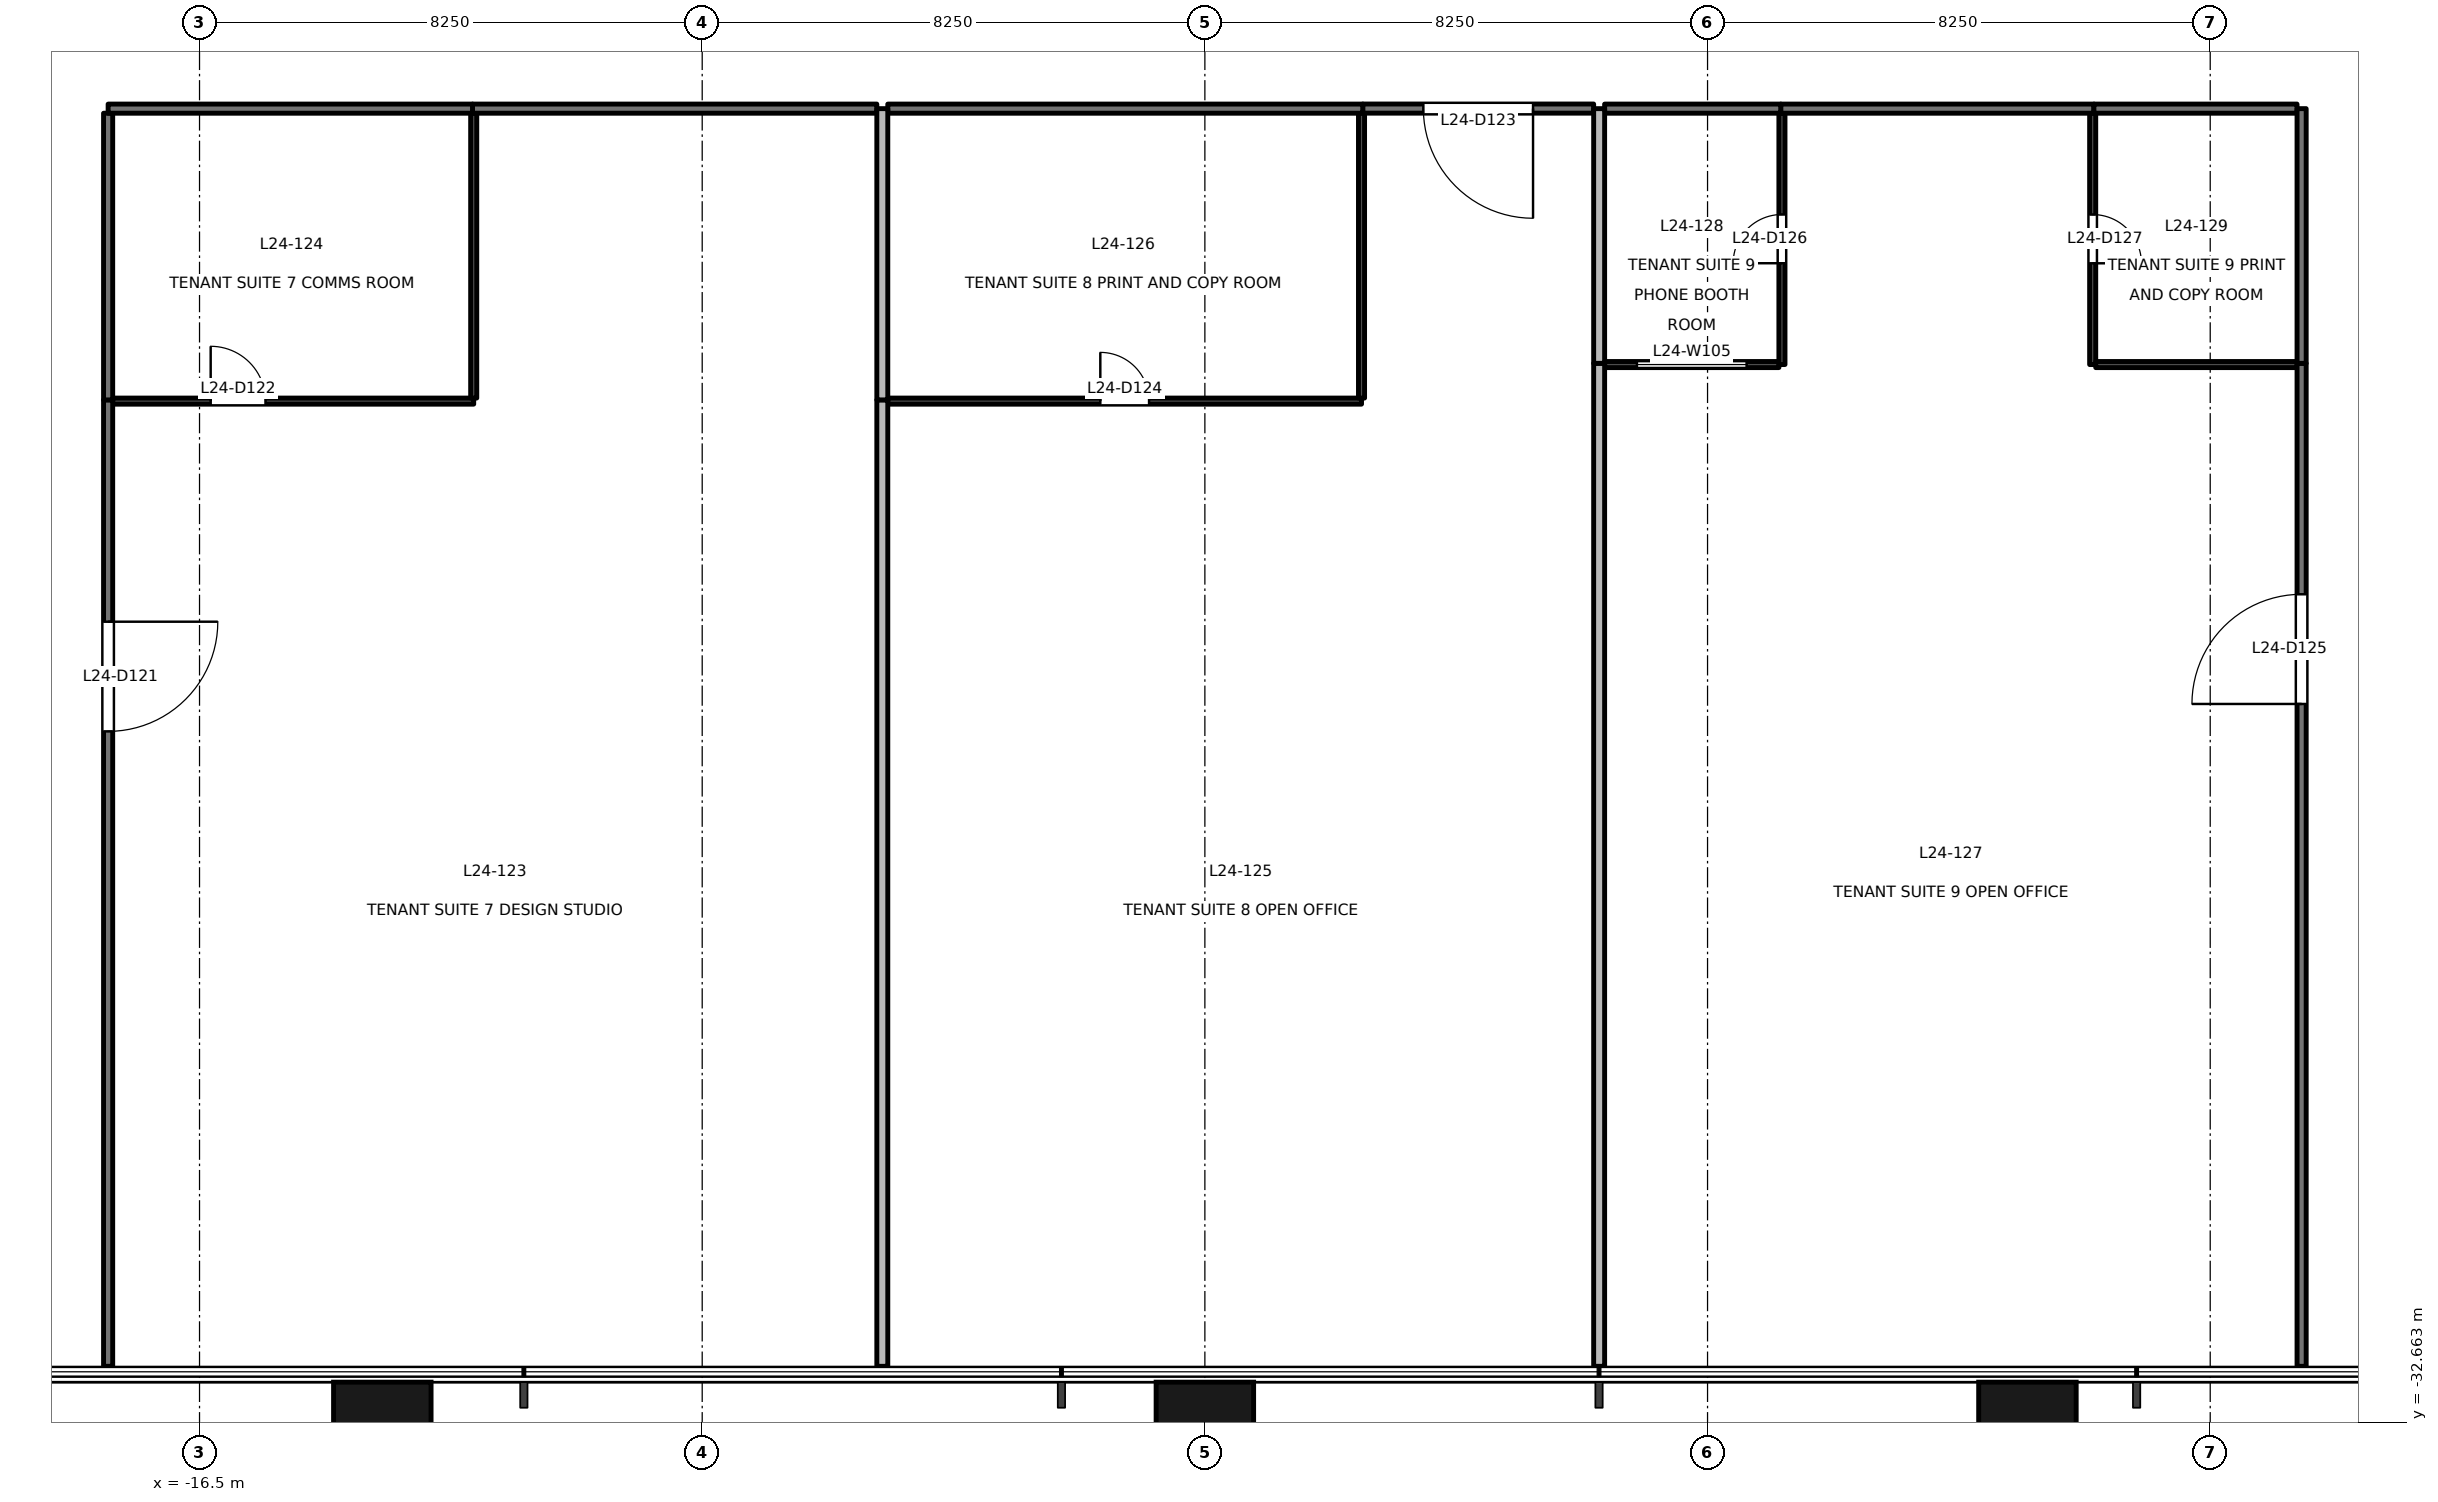
"""IFC4 building model, lengths in metres.
Left out: names, types, materials, properties, quantities, classifications, styles, units other than length and angle.
Written with IfcOpenShell. Run it as: python <this file> out.ifc"""

import sys

from ifc_helpers import new_model, si_unit, direction, frame, frame_2d, origin, origin_2d, place, context, subcontext, project, spatial, rectangle, extrude, element, fill, save


model = new_model("IFC4")
c1 = context("Model", 3, precision=1e-05, world=origin(), true_north=direction((0.0, 1.0)))
c2 = subcontext(c1, "Body", "Model", "MODEL_VIEW")
j1 = project(units=[si_unit("LENGTHUNIT", "METRE"), si_unit("PLANEANGLEUNIT", "RADIAN")], contexts=[c1])
p1 = place(None, origin())
s1 = spatial("IfcSite", under=j1, at=p1, CompositionType="ELEMENT")
p2 = place(p1, origin())
s2 = spatial("IfcBuilding", under=s1, at=p2, CompositionType="ELEMENT")
p3 = place(p2, frame((0.0, 0.0, 107.7)))
s3 = spatial("IfcBuildingStorey", under=s2, at=p3, CompositionType="ELEMENT", Elevation=107.7)
for number, where, z_axis, x_axis in (
    (1, (-13.5, -32.9, -0.2), (0.0, 0.0, 1.0), (1.0, 0.0, 0.0)),
    (2, (0.0, -32.9, -0.2), (0.0, 0.0, 1.0), (1.0, 0.0, 0.0)),
    (3, (13.5, -32.9, -0.2), (0.0, 0.0, 1.0), (1.0, 0.0, 0.0)),
):
    element("IfcColumn", number, at=place(p3, frame(where, z_axis=z_axis, x_axis=x_axis)), inside=s3, PredefinedType="COLUMN", context=c2, shape_type="SweptSolid", body=[
        extrude(rectangle(XDim=1.6, YDim=1.8, at=origin_2d()), origin(), (0.0, 0.0, 1.0), 4.0),
    ])
p4 = place(p3, frame((-18.0, -15.88, 0.0), z_axis=(0.0, 0.0, 1.0), x_axis=(0.0, -1.0, 0.0)))
e4 = element("IfcWall", 4, at=p4, inside=s3, PredefinedType="PARTITIONING", context=c2, shape_type="SweptSolid", body=[
    extrude(rectangle(XDim=15.86, YDim=0.15, at=frame_2d((7.93, 0.0))), origin(), (0.0, 0.0, 1.0), 3.8),
])
p5 = place(p4, frame((3.64, 0.0, 0.0)))
e5 = element("IfcOpeningElement", 5, at=p5, cuts=e4, PredefinedType="OPENING", context=c2, shape_type="SweptSolid", body=[
    extrude(rectangle(XDim=1.8, YDim=2.1, at=frame_2d((0.9, 1.05))), frame((0.0, 0.085, 0.0), z_axis=(0.0, -1.0, 0.0), x_axis=(1.0, 0.0, 0.0)), (0.0, 0.0, 1.0), 0.171),
])
p6 = place(p3, frame((-5.384, -11.1, 0.0), z_axis=(0.0, 0.0, 1.0), x_axis=(-1.0, 0.0, 0.0)))
e6 = element("IfcWall", 6, at=p6, inside=s3, PredefinedType="PARTITIONING", context=c2, shape_type="SweptSolid", body=[
    extrude(rectangle(XDim=6.636, YDim=0.15, at=frame_2d((3.318, 0.0))), origin(), (0.0, 0.0, 1.0), 2.8),
])
p7 = place(p3, frame((-18.0, -11.175, 0.0), z_axis=(0.0, 0.0, 1.0), x_axis=(0.0, -1.0, 0.0)))
e7 = element("IfcWall", 7, at=p7, inside=s3, PredefinedType="PARTITIONING", context=c2, shape_type="SweptSolid", body=[
    extrude(rectangle(XDim=4.705, YDim=0.15, at=frame_2d((2.353, 0.0))), origin(), (0.0, 0.0, 1.0), 3.8),
])
p8 = place(p3, frame((-12.02, -11.1, 0.0), z_axis=(0.0, 0.0, 1.0), x_axis=(-1.0, 0.0, 0.0)))
e8 = element("IfcWall", 8, at=p8, inside=s3, PredefinedType="PARTITIONING", context=c2, shape_type="SweptSolid", body=[
    extrude(rectangle(XDim=5.98, YDim=0.15, at=frame_2d((2.99, 0.0))), origin(), (0.0, 0.0, 1.0), 2.8),
])
p9 = place(p3, frame((6.381, -11.099, 0.0), z_axis=(0.0, 0.0, 1.0), x_axis=(-1.0, 0.0, 0.0)))
e9 = element("IfcWall", 9, at=p9, inside=s3, PredefinedType="PARTITIONING", context=c2, shape_type="SweptSolid", body=[
    extrude(rectangle(XDim=3.79, YDim=0.15, at=frame_2d((1.895, 0.0))), origin(), (0.0, 0.0, 1.0), 2.8),
])
p10 = place(p9, frame((0.995, 0.0, 0.0)))
e10 = element("IfcOpeningElement", 10, at=p10, cuts=e9, PredefinedType="OPENING", context=c2, shape_type="SweptSolid", body=[
    extrude(rectangle(XDim=1.8, YDim=2.1, at=frame_2d((0.9, 1.05))), frame((0.0, 0.085, 0.0), z_axis=(0.0, -1.0, 0.0), x_axis=(1.0, 0.0, 0.0)), (0.0, 0.0, 1.0), 0.171),
])
p11 = place(p3, frame((2.591, -11.1, 0.0), z_axis=(0.0, 0.0, 1.0), x_axis=(-1.0, 0.0, 0.0)))
e11 = element("IfcWall", 11, at=p11, inside=s3, PredefinedType="PARTITIONING", context=c2, shape_type="SweptSolid", body=[
    extrude(rectangle(XDim=7.795, YDim=0.15, at=frame_2d((3.897, 0.0))), origin(), (0.0, 0.0, 1.0), 2.8),
])
p12 = place(p3, frame((14.591, -11.1, 0.0), z_axis=(0.0, 0.0, 1.0), x_axis=(-1.0, 0.0, 0.0)))
e12 = element("IfcWall", 12, at=p12, inside=s3, PredefinedType="PARTITIONING", context=c2, shape_type="SweptSolid", body=[
    extrude(rectangle(XDim=5.14, YDim=0.15, at=frame_2d((2.57, 0.0))), origin(), (0.0, 0.0, 1.0), 2.8),
])
p13 = place(p3, frame((18.0, -31.74, 0.0), z_axis=(0.0, 0.0, 1.0), x_axis=(0.0, 1.0, 0.0)))
e13 = element("IfcWall", 13, at=p13, inside=s3, PredefinedType="PARTITIONING", context=c2, shape_type="SweptSolid", body=[
    extrude(rectangle(XDim=16.46, YDim=0.15, at=frame_2d((8.23, 0.0))), origin(), (0.0, 0.0, 1.0), 2.4),
])
p14 = place(p13, frame((10.87, 0.0, 0.0)))
e14 = element("IfcOpeningElement", 14, at=p14, cuts=e13, PredefinedType="OPENING", context=c2, shape_type="SweptSolid", body=[
    extrude(rectangle(XDim=1.8, YDim=2.1, at=frame_2d((0.9, 1.05))), frame((0.0, 0.085, 0.0), z_axis=(0.0, -1.0, 0.0), x_axis=(1.0, 0.0, 0.0)), (0.0, 0.0, 1.0), 0.171),
])
p15 = place(p3, frame((9.451, -11.1, 0.0), z_axis=(0.0, 0.0, 1.0), x_axis=(-1.0, 0.0, 0.0)))
e15 = element("IfcWall", 15, at=p15, inside=s3, PredefinedType="PARTITIONING", context=c2, shape_type="SweptSolid", body=[
    extrude(rectangle(XDim=2.89, YDim=0.15, at=frame_2d((1.445, 0.0))), origin(), (0.0, 0.0, 1.0), 2.8),
])
p16 = place(p3, frame((17.925, -11.1, 0.0), z_axis=(0.0, 0.0, 1.0), x_axis=(-1.0, 0.0, 0.0)))
e16 = element("IfcWall", 16, at=p16, inside=s3, PredefinedType="PARTITIONING", context=c2, shape_type="SweptSolid", body=[
    extrude(rectangle(XDim=3.334, YDim=0.15, at=frame_2d((1.667, 0.0))), origin(), (0.0, 0.0, 1.0), 2.4),
])
p17 = place(p3, frame((18.0, -15.28, 0.0), z_axis=(0.0, 0.0, 1.0), x_axis=(0.0, 1.0, 0.0)))
e17 = element("IfcWall", 17, at=p17, inside=s3, PredefinedType="PARTITIONING", context=c2, shape_type="SweptSolid", body=[
    extrude(rectangle(XDim=4.18, YDim=0.15, at=frame_2d((2.09, 0.0))), origin(), (0.0, 0.0, 1.0), 2.4),
])
p18 = place(p3, frame((-17.925, -15.9, 0.0), z_axis=(0.0, 0.0, 1.0), x_axis=(1.0, 0.0, 0.0)))
e18 = element("IfcWall", 18, at=p18, inside=s3, PredefinedType="PARTITIONING", context=c2, shape_type="SweptSolid", body=[
    extrude(rectangle(XDim=5.925, YDim=0.1, at=frame_2d((2.962, 0.0))), origin(), (0.0, 0.0, 1.0), 2.8),
])
p19 = place(p18, frame((1.608, 0.0, 0.0)))
e19 = element("IfcOpeningElement", 19, at=p19, cuts=e18, PredefinedType="OPENING", context=c2, shape_type="SweptSolid", body=[
    extrude(rectangle(XDim=0.9, YDim=2.1, at=frame_2d((0.45, 1.05))), frame((0.0, 0.061, 0.0), z_axis=(0.0, -1.0, 0.0), x_axis=(1.0, 0.0, 0.0)), (0.0, 0.0, 1.0), 0.121),
])
p20 = place(p3, frame((-12.0, -15.85, 0.0), z_axis=(0.0, 0.0, 1.0), x_axis=(0.0, 1.0, 0.0)))
e20 = element("IfcWall", 20, at=p20, inside=s3, PredefinedType="PARTITIONING", context=c2, shape_type="SweptSolid", body=[
    extrude(rectangle(XDim=4.675, YDim=0.1, at=frame_2d((2.337, 0.0))), origin(), (0.0, 0.0, 1.0), 3.8),
])
p21 = place(p3, frame((-5.294, -15.88, 0.0), z_axis=(0.0, 0.0, 1.0), x_axis=(0.0, -1.0, 0.0)))
e21 = element("IfcWall", 21, at=p21, inside=s3, PredefinedType="PARTITIONING", context=c2, shape_type="SweptSolid", body=[
    extrude(rectangle(XDim=15.86, YDim=0.18, at=frame_2d((7.93, 0.0))), origin(), (0.0, 0.0, 1.0), 3.8),
])
p22 = place(p3, frame((-5.294, -11.1, 0.0), z_axis=(0.0, 0.0, 1.0), x_axis=(0.0, -1.0, 0.0)))
e22 = element("IfcWall", 22, at=p22, inside=s3, PredefinedType="PARTITIONING", context=c2, shape_type="SweptSolid", body=[
    extrude(rectangle(XDim=4.78, YDim=0.18, at=frame_2d((2.39, 0.0))), origin(), (0.0, 0.0, 1.0), 3.8),
])
p23 = place(p3, frame((-5.204, -15.9, 0.0), z_axis=(0.0, 0.0, 1.0), x_axis=(1.0, 0.0, 0.0)))
e23 = element("IfcWall", 23, at=p23, inside=s3, PredefinedType="PARTITIONING", context=c2, shape_type="SweptSolid", body=[
    extrude(rectangle(XDim=7.775, YDim=0.1, at=frame_2d((3.888, 0.0))), origin(), (0.0, 0.0, 1.0), 2.8),
])
p24 = place(p23, frame((3.488, 0.0, 0.0)))
e24 = element("IfcOpeningElement", 24, at=p24, cuts=e23, PredefinedType="OPENING", context=c2, shape_type="SweptSolid", body=[
    extrude(rectangle(XDim=0.8, YDim=2.1, at=frame_2d((0.4, 1.05))), frame((0.0, 0.061, 0.0), z_axis=(0.0, -1.0, 0.0), x_axis=(1.0, 0.0, 0.0)), (0.0, 0.0, 1.0), 0.121),
])
p25 = place(p3, frame((2.571, -15.85, 0.0), z_axis=(0.0, 0.0, 1.0), x_axis=(0.0, 1.0, 0.0)))
e25 = element("IfcWall", 25, at=p25, inside=s3, PredefinedType="PARTITIONING", context=c2, shape_type="SweptSolid", body=[
    extrude(rectangle(XDim=4.675, YDim=0.1, at=frame_2d((2.337, 0.0))), origin(), (0.0, 0.0, 1.0), 3.8),
])
p26 = place(p3, frame((6.471, -15.28, 0.0), z_axis=(0.0, 0.0, 1.0), x_axis=(0.0, -1.0, 0.0)))
e26 = element("IfcWall", 26, at=p26, inside=s3, PredefinedType="PARTITIONING", context=c2, shape_type="SweptSolid", body=[
    extrude(rectangle(XDim=16.46, YDim=0.18, at=frame_2d((8.23, 0.0))), origin(), (0.0, 0.0, 1.0), 3.8),
])
p27 = place(p3, frame((6.471, -11.1, 0.0), z_axis=(0.0, 0.0, 1.0), x_axis=(0.0, -1.0, 0.0)))
e27 = element("IfcWall", 27, at=p27, inside=s3, PredefinedType="PARTITIONING", context=c2, shape_type="SweptSolid", body=[
    extrude(rectangle(XDim=4.18, YDim=0.18, at=frame_2d((2.09, 0.0))), origin(), (0.0, 0.0, 1.0), 3.8),
])
p28 = place(p3, frame((6.561, -15.3, 0.0), z_axis=(0.0, 0.0, 1.0), x_axis=(1.0, 0.0, 0.0)))
e28 = element("IfcWall", 28, at=p28, inside=s3, PredefinedType="PARTITIONING", context=c2, shape_type="SweptSolid", body=[
    extrude(rectangle(XDim=2.86, YDim=0.1, at=frame_2d((1.43, 0.0))), origin(), (0.0, 0.0, 1.0), 2.8),
])
p29 = place(p28, frame((0.53, 0.0, 0.9)))
e29 = element("IfcOpeningElement", 29, at=p29, cuts=e28, PredefinedType="OPENING", context=c2, shape_type="SweptSolid", body=[
    extrude(rectangle(XDim=1.8, YDim=1.2, at=frame_2d((0.9, 0.6))), frame((0.0, 0.061, 0.0), z_axis=(0.0, -1.0, 0.0), x_axis=(1.0, 0.0, 0.0)), (0.0, 0.0, 1.0), 0.121),
])
p30 = place(p3, frame((9.471, -15.3, 0.0), z_axis=(0.0, 0.0, 1.0), x_axis=(0.0, 1.0, 0.0)))
e30 = element("IfcWall", 30, at=p30, inside=s3, PredefinedType="PARTITIONING", context=c2, shape_type="SweptSolid", body=[
    extrude(rectangle(XDim=4.125, YDim=0.1, at=frame_2d((2.062, 0.0))), origin(), (0.0, 0.0, 1.0), 3.8),
])
p31 = place(p30, frame((1.663, 0.0, 0.0)))
e31 = element("IfcOpeningElement", 31, at=p31, cuts=e30, PredefinedType="OPENING", context=c2, shape_type="SweptSolid", body=[
    extrude(rectangle(XDim=0.8, YDim=2.1, at=frame_2d((0.4, 1.05))), frame((0.0, 0.061, 0.0), z_axis=(0.0, -1.0, 0.0), x_axis=(1.0, 0.0, 0.0)), (0.0, 0.0, 1.0), 0.121),
])
p32 = place(p3, frame((14.571, -11.175, 0.0), z_axis=(0.0, 0.0, 1.0), x_axis=(0.0, -1.0, 0.0)))
e32 = element("IfcWall", 32, at=p32, inside=s3, PredefinedType="PARTITIONING", context=c2, shape_type="SweptSolid", body=[
    extrude(rectangle(XDim=4.125, YDim=0.1, at=frame_2d((2.062, 0.0))), origin(), (0.0, 0.0, 1.0), 3.8),
])
p33 = place(p32, frame((1.663, 0.0, 0.0)))
e33 = element("IfcOpeningElement", 33, at=p33, cuts=e32, PredefinedType="OPENING", context=c2, shape_type="SweptSolid", body=[
    extrude(rectangle(XDim=0.8, YDim=2.1, at=frame_2d((0.4, 1.05))), frame((0.0, 0.061, 0.0), z_axis=(0.0, -1.0, 0.0), x_axis=(1.0, 0.0, 0.0)), (0.0, 0.0, 1.0), 0.121),
])
p34 = place(p3, frame((14.621, -15.3, 0.0), z_axis=(0.0, 0.0, 1.0), x_axis=(1.0, 0.0, 0.0)))
e34 = element("IfcWall", 34, at=p34, inside=s3, PredefinedType="PARTITIONING", context=c2, shape_type="SweptSolid", body=[
    extrude(rectangle(XDim=3.304, YDim=0.1, at=frame_2d((1.652, 0.0))), origin(), (0.0, 0.0, 1.0), 2.4),
])
p35 = place(p5, origin())
e35 = element("IfcDoor", 35, at=p35, inside=s3, OperationType="DOUBLE_DOOR_SINGLE_SWING", PredefinedType="DOOR", context=c2, shape_type="SweptSolid", body=[
    extrude(rectangle(XDim=1.8, YDim=2.1, at=frame_2d((0.9, 1.05))), frame((0.0, 0.025, 0.0), z_axis=(0.0, -1.0, 0.0), x_axis=(1.0, 0.0, 0.0)), (0.0, 0.0, 1.0), 0.05),
])
fill(e5, e35)
p36 = place(p19, origin())
e36 = element("IfcDoor", 36, at=p36, inside=s3, OperationType="SINGLE_SWING_LEFT", PredefinedType="DOOR", context=c2, shape_type="SweptSolid", body=[
    extrude(rectangle(XDim=0.9, YDim=2.1, at=frame_2d((0.45, 1.05))), frame((0.0, 0.025, 0.0), z_axis=(0.0, -1.0, 0.0), x_axis=(1.0, 0.0, 0.0)), (0.0, 0.0, 1.0), 0.05),
])
fill(e19, e36)
p37 = place(p10, origin())
e37 = element("IfcDoor", 37, at=p37, inside=s3, OperationType="DOUBLE_DOOR_SINGLE_SWING", PredefinedType="DOOR", context=c2, shape_type="SweptSolid", body=[
    extrude(rectangle(XDim=1.8, YDim=2.1, at=frame_2d((0.9, 1.05))), frame((0.0, 0.025, 0.0), z_axis=(0.0, -1.0, 0.0), x_axis=(1.0, 0.0, 0.0)), (0.0, 0.0, 1.0), 0.05),
])
fill(e10, e37)
p38 = place(p24, origin())
e38 = element("IfcDoor", 38, at=p38, inside=s3, OperationType="SINGLE_SWING_LEFT", PredefinedType="DOOR", context=c2, shape_type="SweptSolid", body=[
    extrude(rectangle(XDim=0.8, YDim=2.1, at=frame_2d((0.4, 1.05))), frame((0.0, 0.025, 0.0), z_axis=(0.0, -1.0, 0.0), x_axis=(1.0, 0.0, 0.0)), (0.0, 0.0, 1.0), 0.05),
])
fill(e24, e38)
p39 = place(p14, origin())
e39 = element("IfcDoor", 39, at=p39, inside=s3, OperationType="DOUBLE_DOOR_SINGLE_SWING", PredefinedType="DOOR", context=c2, shape_type="SweptSolid", body=[
    extrude(rectangle(XDim=1.8, YDim=2.1, at=frame_2d((0.9, 1.05))), frame((0.0, 0.025, 0.0), z_axis=(0.0, -1.0, 0.0), x_axis=(1.0, 0.0, 0.0)), (0.0, 0.0, 1.0), 0.05),
])
fill(e14, e39)
p40 = place(p31, origin())
e40 = element("IfcDoor", 40, at=p40, inside=s3, OperationType="SINGLE_SWING_LEFT", PredefinedType="DOOR", context=c2, shape_type="SweptSolid", body=[
    extrude(rectangle(XDim=0.8, YDim=2.1, at=frame_2d((0.4, 1.05))), frame((0.0, 0.025, 0.0), z_axis=(0.0, -1.0, 0.0), x_axis=(1.0, 0.0, 0.0)), (0.0, 0.0, 1.0), 0.05),
])
fill(e31, e40)
p41 = place(p33, origin())
e41 = element("IfcDoor", 41, at=p41, inside=s3, OperationType="SINGLE_SWING_RIGHT", PredefinedType="DOOR", context=c2, shape_type="SweptSolid", body=[
    extrude(rectangle(XDim=0.8, YDim=2.1, at=frame_2d((0.4, 1.05))), frame((0.0, 0.025, 0.0), z_axis=(0.0, -1.0, 0.0), x_axis=(1.0, 0.0, 0.0)), (0.0, 0.0, 1.0), 0.05),
])
fill(e33, e41)
p42 = place(p29, origin())
e42 = element("IfcWindow", 42, at=p42, inside=s3, PartitioningType="SINGLE_PANEL", PredefinedType="WINDOW", context=c2, shape_type="SweptSolid", body=[
    extrude(rectangle(XDim=1.8, YDim=1.2, at=frame_2d((0.9, 0.6))), frame((0.0, 0.03, 0.0), z_axis=(0.0, -1.0, 0.0), x_axis=(1.0, 0.0, 0.0)), (0.0, 0.0, 1.0), 0.06),
])
fill(e29, e42)
save(model, sys.argv[1])
